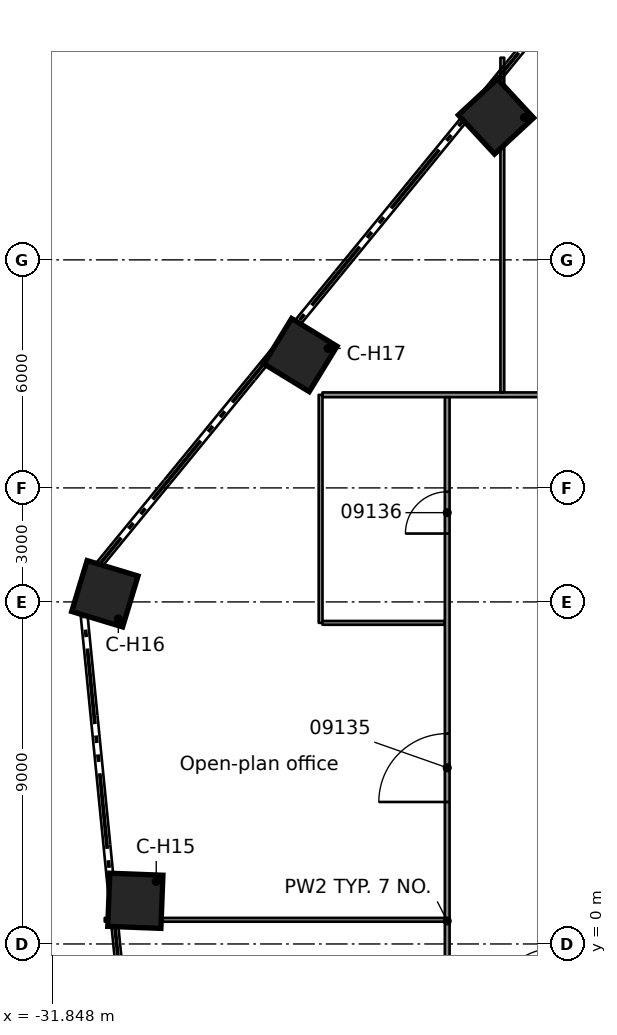
"""IFC4 building model, lengths in metres.
Left out: names, types, materials, properties, quantities, classifications, styles, units other than length and angle.
Written with IfcOpenShell. Run it as: python <this file> out.ifc"""

import sys

from ifc_helpers import new_model, si_unit, direction, frame, frame_2d, origin, origin_2d, place, context, subcontext, project, spatial, rectangle, extrude, element, fill, save


model = new_model("IFC4")
c1 = context("Model", 3, precision=1e-05, world=origin(), true_north=direction((0.0, 1.0)))
c2 = subcontext(c1, "Body", "Model", "MODEL_VIEW")
j1 = project(units=[si_unit("LENGTHUNIT", "METRE"), si_unit("PLANEANGLEUNIT", "RADIAN")], contexts=[c1])
p1 = place(None, origin())
s1 = spatial("IfcSite", under=j1, at=p1, CompositionType="ELEMENT")
p2 = place(p1, origin())
s2 = spatial("IfcBuilding", under=s1, at=p2, CompositionType="ELEMENT")
p3 = place(p2, frame((0.0, 0.0, 40.8)))
s3 = spatial("IfcBuildingStorey", under=s2, at=p3, CompositionType="ELEMENT", Elevation=40.8)
for number, where, z_axis, x_axis in (
    (1, (-29.657, 1.136, 0.0), (0.0, 0.0, 1.0), (-0.999, 0.038, 0.0)),
    (2, (-30.459, 9.215, 0.0), (0.0, 0.0, 1.0), (-0.957, 0.29, 0.0)),
    (3, (-25.313, 15.495, 0.0), (0.0, 0.0, 1.0), (-0.853, 0.522, 0.0)),
    (4, (-20.167, 21.774, 0.0), (0.0, 0.0, 1.0), (-0.68, 0.734, 0.0)),
):
    element("IfcColumn", number, at=place(p3, frame(where, z_axis=z_axis, x_axis=x_axis)), inside=s3, PredefinedType="COLUMN", context=c2, shape_type="SweptSolid", body=[
        extrude(rectangle(XDim=1.4, YDim=1.4, at=origin_2d()), origin(), (0.0, 0.0, 1.0), 3.5),
    ])
p4 = place(p3, frame((-30.462, 0.636, 0.0), z_axis=(0.0, 0.0, 1.0), x_axis=(1.0, 0.0, 0.0)))
e5 = element("IfcWall", 5, at=p4, inside=s3, PredefinedType="PARTITIONING", context=c2, shape_type="SweptSolid", body=[
    extrude(rectangle(XDim=8.95, YDim=0.1, at=frame_2d((4.475, 0.0))), origin(), (0.0, 0.0, 1.0), 3.06),
])
p5 = place(p3, frame((-24.732, 8.449, 0.0), z_axis=(0.0, 0.0, 1.0), x_axis=(1.0, 0.0, 0.0)))
e6 = element("IfcWall", 6, at=p5, inside=s3, PredefinedType="PARTITIONING", context=c2, shape_type="SweptSolid", body=[
    extrude(rectangle(XDim=3.22, YDim=0.1, at=frame_2d((1.61, 0.0))), origin(), (0.0, 0.0, 1.0), 3.06),
])
p6 = place(p3, frame((-24.731, 14.45, 0.0), z_axis=(0.0, 0.0, 1.0), x_axis=(1.0, 0.0, 0.0)))
e7 = element("IfcWall", 7, at=p6, inside=s3, PredefinedType="PARTITIONING", context=c2, shape_type="SweptSolid", body=[
    extrude(rectangle(XDim=14.34, YDim=0.125, at=frame_2d((7.17, 0.0))), origin(), (0.0, 0.0, 1.0), 3.06),
])
p7 = place(p6, frame((8.581, 0.0, 0.0)))
e8 = element("IfcOpeningElement", 8, at=p7, cuts=e7, PredefinedType="OPENING", context=c2, shape_type="SweptSolid", body=[
    extrude(rectangle(XDim=1.8, YDim=2.1, at=frame_2d((0.9, 1.05))), frame((0.0, 0.073, 0.0), z_axis=(0.0, -1.0, 0.0), x_axis=(1.0, 0.0, 0.0)), (0.0, 0.0, 1.0), 0.145),
])
p8 = place(p3, frame((-20.0, 14.514, 0.0), z_axis=(0.0, 0.0, 1.0), x_axis=(0.0, 1.0, 0.0)))
e9 = element("IfcWall", 9, at=p8, inside=s3, PredefinedType="PARTITIONING", context=c2, shape_type="SweptSolid", body=[
    extrude(rectangle(XDim=8.805, YDim=0.1, at=frame_2d((4.403, 0.0))), origin(), (0.0, 0.0, 1.0), 3.06),
])
p9 = place(p3, frame((-21.45, -13.175, 0.0), z_axis=(0.0, 0.0, 1.0), x_axis=(0.0, 1.0, 0.0)))
e10 = element("IfcWall", 10, at=p9, inside=s3, PredefinedType="PARTITIONING", context=c2, shape_type="SweptSolid", body=[
    extrude(rectangle(XDim=27.561, YDim=0.125, at=frame_2d((13.781, 0.0))), origin(), (0.0, 0.0, 1.0), 3.06),
])
p10 = place(p9, frame((6.35, 0.0, 0.0)))
e11 = element("IfcOpeningElement", 11, at=p10, cuts=e10, PredefinedType="OPENING", context=c2, shape_type="SweptSolid", body=[
    extrude(rectangle(XDim=0.9, YDim=2.1, at=frame_2d((0.45, 1.05))), frame((0.0, 0.073, 0.0), z_axis=(0.0, -1.0, 0.0), x_axis=(1.0, 0.0, 0.0)), (0.0, 0.0, 1.0), 0.145),
])
p11 = place(p9, frame((16.911, 0.0, 0.0)))
e12 = element("IfcOpeningElement", 12, at=p11, cuts=e10, PredefinedType="OPENING", context=c2, shape_type="SweptSolid", body=[
    extrude(rectangle(XDim=1.8, YDim=2.1, at=frame_2d((0.9, 1.05))), frame((0.0, 0.073, 0.0), z_axis=(0.0, -1.0, 0.0), x_axis=(1.0, 0.0, 0.0)), (0.0, 0.0, 1.0), 0.145),
])
p12 = place(p9, frame((23.974, 0.0, 0.0)))
e13 = element("IfcOpeningElement", 13, at=p12, cuts=e10, PredefinedType="OPENING", context=c2, shape_type="SweptSolid", body=[
    extrude(rectangle(XDim=1.1, YDim=2.1, at=frame_2d((0.55, 1.05))), frame((0.0, 0.073, 0.0), z_axis=(0.0, -1.0, 0.0), x_axis=(1.0, 0.0, 0.0)), (0.0, 0.0, 1.0), 0.145),
])
p13 = place(p3, frame((-24.782, 8.449, 0.0), z_axis=(0.0, 0.0, 1.0), x_axis=(0.0, 1.0, 0.0)))
e14 = element("IfcWall", 14, at=p13, inside=s3, PredefinedType="PARTITIONING", context=c2, shape_type="SweptSolid", body=[
    extrude(rectangle(XDim=6.0, YDim=0.1, at=frame_2d((3.0, 0.0))), origin(), (0.0, 0.0, 1.0), 3.06),
])
p14 = place(p11, origin())
e15 = element("IfcDoor", 15, at=p14, inside=s3, OperationType="DOUBLE_DOOR_SINGLE_SWING", PredefinedType="DOOR", context=c2, shape_type="SweptSolid", body=[
    extrude(rectangle(XDim=1.8, YDim=2.1, at=frame_2d((0.9, 1.05))), frame((0.0, 0.025, 0.0), z_axis=(0.0, -1.0, 0.0), x_axis=(1.0, 0.0, 0.0)), (0.0, 0.0, 1.0), 0.05),
])
fill(e12, e15)
p15 = place(p12, origin())
e16 = element("IfcDoor", 16, at=p15, inside=s3, OperationType="SINGLE_SWING_RIGHT", PredefinedType="DOOR", context=c2, shape_type="SweptSolid", body=[
    extrude(rectangle(XDim=1.1, YDim=2.1, at=frame_2d((0.55, 1.05))), frame((0.0, 0.025, 0.0), z_axis=(0.0, -1.0, 0.0), x_axis=(1.0, 0.0, 0.0)), (0.0, 0.0, 1.0), 0.05),
])
fill(e13, e16)
save(model, sys.argv[1])
